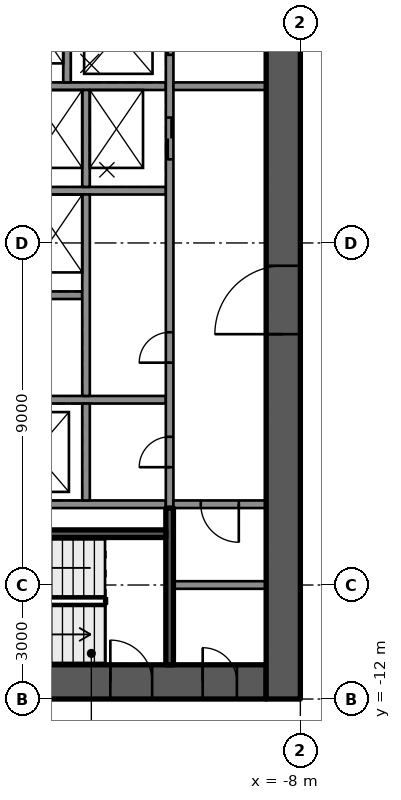
"""IFC4 building model, lengths in metres.
Left out: names, types, materials, properties, quantities, classifications, styles, units other than length and angle.
Written with IfcOpenShell. Run it as: python <this file> out.ifc"""

import sys

from ifc_helpers import new_model, si_unit, direction, frame, frame_2d, origin, place, context, subcontext, project, spatial, rectangle, extrude, element, fill, save


model = new_model("IFC4")
c1 = context("Model", 3, precision=1e-05, world=origin(), true_north=direction((0.0, 1.0)))
c2 = subcontext(c1, "Body", "Model", "MODEL_VIEW")
j1 = project(units=[si_unit("LENGTHUNIT", "METRE"), si_unit("PLANEANGLEUNIT", "RADIAN")], contexts=[c1])
p1 = place(None, origin())
s1 = spatial("IfcSite", under=j1, at=p1, CompositionType="ELEMENT")
p2 = place(p1, origin())
s2 = spatial("IfcBuilding", under=s1, at=p2, CompositionType="ELEMENT")
p3 = place(p2, frame((0.0, 0.0, 149.1)))
s3 = spatial("IfcBuildingStorey", under=s2, at=p3, CompositionType="ELEMENT", Elevation=149.1)
p4 = place(p3, frame((-18.1, -11.55, 0.0), z_axis=(0.0, 0.0, 1.0), x_axis=(1.0, 0.0, 0.0)))
e1 = element("IfcWall", 1, at=p4, inside=s3, PredefinedType="SHEAR", context=c2, shape_type="SweptSolid", body=[
    extrude(rectangle(XDim=9.2, YDim=0.9, at=frame_2d((4.6, 0.0))), origin(), (0.0, 0.0, 1.0), 3.5),
])
p5 = place(p4, frame((5.1, 0.0, 0.0)))
e2 = element("IfcOpeningElement", 2, at=p5, cuts=e1, PredefinedType="OPENING", context=c2, shape_type="SweptSolid", body=[
    extrude(rectangle(XDim=1.1, YDim=2.1, at=frame_2d((0.55, 1.05))), frame((0.0, 0.46, 0.0), z_axis=(0.0, -1.0, 0.0), x_axis=(1.0, 0.0, 0.0)), (0.0, 0.0, 1.0), 0.92),
])
p6 = place(p4, frame((7.53, 0.0, 0.0)))
e3 = element("IfcOpeningElement", 3, at=p6, cuts=e1, PredefinedType="OPENING", context=c2, shape_type="SweptSolid", body=[
    extrude(rectangle(XDim=0.9, YDim=2.1, at=frame_2d((0.45, 1.05))), frame((0.0, 0.46, 0.0), z_axis=(0.0, -1.0, 0.0), x_axis=(1.0, 0.0, 0.0)), (0.0, 0.0, 1.0), 0.92),
])
p7 = place(p3, frame((-8.45, -12.0, 0.0), z_axis=(0.0, 0.0, 1.0), x_axis=(0.0, 1.0, 0.0)))
e4 = element("IfcWall", 4, at=p7, inside=s3, PredefinedType="SHEAR", context=c2, shape_type="SweptSolid", body=[
    extrude(rectangle(XDim=24.0, YDim=0.9, at=frame_2d((12.0, 0.0))), origin(), (0.0, 0.0, 1.0), 3.5),
])
p8 = place(p7, frame((9.6, 0.0, 0.0)))
e5 = element("IfcOpeningElement", 5, at=p8, cuts=e4, PredefinedType="OPENING", context=c2, shape_type="SweptSolid", body=[
    extrude(rectangle(XDim=1.8, YDim=2.1, at=frame_2d((0.9, 1.05))), frame((0.0, 0.46, 0.0), z_axis=(0.0, -1.0, 0.0), x_axis=(1.0, 0.0, 0.0)), (0.0, 0.0, 1.0), 0.92),
])
p9 = place(p7, frame((19.65, 0.0, 0.0)))
e6 = element("IfcOpeningElement", 6, at=p9, cuts=e4, PredefinedType="OPENING", context=c2, shape_type="SweptSolid", body=[
    extrude(rectangle(XDim=1.1, YDim=2.1, at=frame_2d((0.55, 1.05))), frame((0.0, 0.46, 0.0), z_axis=(0.0, -1.0, 0.0), x_axis=(1.0, 0.0, 0.0)), (0.0, 0.0, 1.0), 0.92),
])
p10 = place(p3, frame((-11.54, -6.875, 0.0), z_axis=(0.0, 0.0, 1.0), x_axis=(-1.0, 0.0, 0.0)))
e7 = element("IfcWall", 7, at=p10, inside=s3, PredefinedType="SOLIDWALL", context=c2, shape_type="SweptSolid", body=[
    extrude(rectangle(XDim=6.56, YDim=0.2, at=frame_2d((3.28, 0.0))), origin(), (0.0, 0.0, 1.0), 3.09),
])
p11 = place(p3, frame((-11.54, -4.125, 0.0), z_axis=(0.0, 0.0, 1.0), x_axis=(-1.0, 0.0, 0.0)))
e8 = element("IfcWall", 8, at=p11, inside=s3, PredefinedType="SOLIDWALL", context=c2, shape_type="SweptSolid", body=[
    extrude(rectangle(XDim=4.7, YDim=0.2, at=frame_2d((2.35, 0.0))), origin(), (0.0, 0.0, 1.0), 3.09),
])
p12 = place(p3, frame((-13.74, -1.375, 0.0), z_axis=(0.0, 0.0, 1.0), x_axis=(-1.0, 0.0, 0.0)))
e9 = element("IfcWall", 9, at=p12, inside=s3, PredefinedType="SOLIDWALL", context=c2, shape_type="SweptSolid", body=[
    extrude(rectangle(XDim=2.0, YDim=0.2, at=frame_2d((1.0, 0.0))), origin(), (0.0, 0.0, 1.0), 3.09),
])
p13 = place(p3, frame((-11.54, 1.375, 0.0), z_axis=(0.0, 0.0, 1.0), x_axis=(-1.0, 0.0, 0.0)))
e10 = element("IfcWall", 10, at=p13, inside=s3, PredefinedType="SOLIDWALL", context=c2, shape_type="SweptSolid", body=[
    extrude(rectangle(XDim=4.2, YDim=0.2, at=frame_2d((2.1, 0.0))), origin(), (0.0, 0.0, 1.0), 3.09),
])
p14 = place(p3, frame((-11.54, 4.125, 0.0), z_axis=(0.0, 0.0, 1.0), x_axis=(-1.0, 0.0, 0.0)))
e11 = element("IfcWall", 11, at=p14, inside=s3, PredefinedType="SOLIDWALL", context=c2, shape_type="SweptSolid", body=[
    extrude(rectangle(XDim=4.7, YDim=0.2, at=frame_2d((2.35, 0.0))), origin(), (0.0, 0.0, 1.0), 3.09),
])
p15 = place(p3, frame((-11.44, -6.975, 0.0), z_axis=(0.0, 0.0, 1.0), x_axis=(0.0, 1.0, 0.0)))
e12 = element("IfcWall", 12, at=p15, inside=s3, PredefinedType="SOLIDWALL", context=c2, shape_type="SweptSolid", body=[
    extrude(rectangle(XDim=13.95, YDim=0.2, at=frame_2d((6.975, 0.0))), origin(), (0.0, 0.0, 1.0), 3.09),
])
p16 = place(p15, frame((9.175, 0.0, 0.0)))
e13 = element("IfcOpeningElement", 13, at=p16, cuts=e12, PredefinedType="OPENING", context=c2, shape_type="SweptSolid", body=[
    extrude(rectangle(XDim=1.1, YDim=2.1, at=frame_2d((0.55, 1.05))), frame((0.0, 0.11, 0.0), z_axis=(0.0, -1.0, 0.0), x_axis=(1.0, 0.0, 0.0)), (0.0, 0.0, 1.0), 0.22),
])
p17 = place(p15, frame((11.925, 0.0, 0.0)))
e14 = element("IfcOpeningElement", 14, at=p17, cuts=e12, PredefinedType="OPENING", context=c2, shape_type="SweptSolid", body=[
    extrude(rectangle(XDim=1.1, YDim=2.1, at=frame_2d((0.55, 1.05))), frame((0.0, 0.11, 0.0), z_axis=(0.0, -1.0, 0.0), x_axis=(1.0, 0.0, 0.0)), (0.0, 0.0, 1.0), 0.22),
])
p18 = place(p15, frame((1.075, 0.0, 0.0)))
e15 = element("IfcOpeningElement", 15, at=p18, cuts=e12, PredefinedType="OPENING", context=c2, shape_type="SweptSolid", body=[
    extrude(rectangle(XDim=0.8, YDim=2.1, at=frame_2d((0.4, 1.05))), frame((0.0, 0.11, 0.0), z_axis=(0.0, -1.0, 0.0), x_axis=(1.0, 0.0, 0.0)), (0.0, 0.0, 1.0), 0.22),
])
p19 = place(p15, frame((3.825, 0.0, 0.0)))
e16 = element("IfcOpeningElement", 16, at=p19, cuts=e12, PredefinedType="OPENING", context=c2, shape_type="SweptSolid", body=[
    extrude(rectangle(XDim=0.8, YDim=2.1, at=frame_2d((0.4, 1.05))), frame((0.0, 0.11, 0.0), z_axis=(0.0, -1.0, 0.0), x_axis=(1.0, 0.0, 0.0)), (0.0, 0.0, 1.0), 0.22),
])
p20 = place(p3, frame((-13.64, -6.775, 0.0), z_axis=(0.0, 0.0, 1.0), x_axis=(0.0, 1.0, 0.0)))
e17 = element("IfcWall", 17, at=p20, inside=s3, PredefinedType="SOLIDWALL", context=c2, shape_type="SweptSolid", body=[
    extrude(rectangle(XDim=2.55, YDim=0.2, at=frame_2d((1.275, 0.0))), origin(), (0.0, 0.0, 1.0), 3.09),
])
p21 = place(p3, frame((-13.64, -4.025, 0.0), z_axis=(0.0, 0.0, 1.0), x_axis=(0.0, 1.0, 0.0)))
e18 = element("IfcWall", 18, at=p21, inside=s3, PredefinedType="SOLIDWALL", context=c2, shape_type="SweptSolid", body=[
    extrude(rectangle(XDim=5.3, YDim=0.2, at=frame_2d((2.65, 0.0))), origin(), (0.0, 0.0, 1.0), 3.09),
])
for number, where, z_axis, x_axis in (
    (19, (-13.64, 1.475, 0.0), (0.0, 0.0, 1.0), (0.0, 1.0, 0.0)),
    (20, (-14.14, 4.225, 0.0), (0.0, 0.0, 1.0), (0.0, 1.0, 0.0)),
):
    element("IfcWall", number, at=place(p3, frame(where, z_axis=z_axis, x_axis=x_axis)), inside=s3, PredefinedType="SOLIDWALL", context=c2, shape_type="SweptSolid", body=[
        extrude(rectangle(XDim=2.55, YDim=0.2, at=frame_2d((1.275, 0.0))), origin(), (0.0, 0.0, 1.0), 3.09),
    ])
p22 = place(p3, frame((-11.44, -11.1, 0.0), z_axis=(0.0, 0.0, 1.0), x_axis=(0.0, 1.0, 0.0)))
e21 = element("IfcWall", 21, at=p22, inside=s3, PredefinedType="SOLIDWALL", context=c2, shape_type="SweptSolid", body=[
    extrude(rectangle(XDim=4.125, YDim=0.2, at=frame_2d((2.062, 0.0))), origin(), (0.0, 0.0, 1.0), 3.09),
])
p23 = place(p3, frame((-11.54, -7.65, 0.0), z_axis=(0.0, 0.0, 1.0), x_axis=(-1.0, 0.0, 0.0)))
e22 = element("IfcWall", 22, at=p23, inside=s3, PredefinedType="SOLIDWALL", context=c2, shape_type="SweptSolid", body=[
    extrude(rectangle(XDim=6.56, YDim=0.2, at=frame_2d((3.28, 0.0))), origin(), (0.0, 0.0, 1.0), 3.09),
])
p24 = place(p3, frame((-8.9, 4.125, 0.0), z_axis=(0.0, 0.0, 1.0), x_axis=(-1.0, 0.0, 0.0)))
e23 = element("IfcWall", 23, at=p24, inside=s3, PredefinedType="PARTITIONING", context=c2, shape_type="SweptSolid", body=[
    extrude(rectangle(XDim=2.44, YDim=0.2, at=frame_2d((1.22, 0.0))), origin(), (0.0, 0.0, 1.0), 3.09),
])
p25 = place(p3, frame((-8.9, -6.875, 0.0), z_axis=(0.0, 0.0, 1.0), x_axis=(-1.0, 0.0, 0.0)))
e24 = element("IfcWall", 24, at=p25, inside=s3, PredefinedType="PARTITIONING", context=c2, shape_type="SweptSolid", body=[
    extrude(rectangle(XDim=2.44, YDim=0.2, at=frame_2d((1.22, 0.0))), origin(), (0.0, 0.0, 1.0), 3.09),
])
p26 = place(p25, frame((0.72, 0.0, 0.0)))
e25 = element("IfcOpeningElement", 25, at=p26, cuts=e24, PredefinedType="OPENING", context=c2, shape_type="SweptSolid", body=[
    extrude(rectangle(XDim=1.0, YDim=2.1, at=frame_2d((0.5, 1.05))), frame((0.0, 0.11, 0.0), z_axis=(0.0, -1.0, 0.0), x_axis=(1.0, 0.0, 0.0)), (0.0, 0.0, 1.0), 0.22),
])
p27 = place(p3, frame((-8.9, -9.0, 0.0), z_axis=(0.0, 0.0, 1.0), x_axis=(-1.0, 0.0, 0.0)))
e26 = element("IfcWall", 26, at=p27, inside=s3, PredefinedType="PARTITIONING", context=c2, shape_type="SweptSolid", body=[
    extrude(rectangle(XDim=2.44, YDim=0.2, at=frame_2d((1.22, 0.0))), origin(), (0.0, 0.0, 1.0), 3.09),
])
p28 = place(p16, origin())
e27 = element("IfcDoor", 27, at=p28, inside=s3, OperationType="DOUBLE_DOOR_SLIDING", PredefinedType="DOOR", context=c2, shape_type="SweptSolid", body=[
    extrude(rectangle(XDim=1.1, YDim=2.1, at=frame_2d((0.55, 1.05))), frame((0.0, 0.025, 0.0), z_axis=(0.0, -1.0, 0.0), x_axis=(1.0, 0.0, 0.0)), (0.0, 0.0, 1.0), 0.05),
])
fill(e13, e27)
p29 = place(p17, origin())
e28 = element("IfcDoor", 28, at=p29, inside=s3, OperationType="DOUBLE_DOOR_SLIDING", PredefinedType="DOOR", context=c2, shape_type="SweptSolid", body=[
    extrude(rectangle(XDim=1.1, YDim=2.1, at=frame_2d((0.55, 1.05))), frame((0.0, 0.025, 0.0), z_axis=(0.0, -1.0, 0.0), x_axis=(1.0, 0.0, 0.0)), (0.0, 0.0, 1.0), 0.05),
])
fill(e14, e28)
p30 = place(p18, origin())
e29 = element("IfcDoor", 29, at=p30, inside=s3, OperationType="SINGLE_SWING_LEFT", PredefinedType="DOOR", context=c2, shape_type="SweptSolid", body=[
    extrude(rectangle(XDim=0.8, YDim=2.1, at=frame_2d((0.4, 1.05))), frame((0.0, 0.025, 0.0), z_axis=(0.0, -1.0, 0.0), x_axis=(1.0, 0.0, 0.0)), (0.0, 0.0, 1.0), 0.05),
])
fill(e15, e29)
p31 = place(p19, origin())
e30 = element("IfcDoor", 30, at=p31, inside=s3, OperationType="SINGLE_SWING_LEFT", PredefinedType="DOOR", context=c2, shape_type="SweptSolid", body=[
    extrude(rectangle(XDim=0.8, YDim=2.1, at=frame_2d((0.4, 1.05))), frame((0.0, 0.025, 0.0), z_axis=(0.0, -1.0, 0.0), x_axis=(1.0, 0.0, 0.0)), (0.0, 0.0, 1.0), 0.05),
])
fill(e16, e30)
p32 = place(p8, origin())
e31 = element("IfcDoor", 31, at=p32, inside=s3, OperationType="SINGLE_SWING_LEFT", PredefinedType="DOOR", context=c2, shape_type="SweptSolid", body=[
    extrude(rectangle(XDim=1.8, YDim=2.1, at=frame_2d((0.9, 1.05))), frame((0.0, 0.025, 0.0), z_axis=(0.0, -1.0, 0.0), x_axis=(1.0, 0.0, 0.0)), (0.0, 0.0, 1.0), 0.05),
])
fill(e5, e31)
p33 = place(p5, origin())
e32 = element("IfcDoor", 32, at=p33, inside=s3, OperationType="SINGLE_SWING_RIGHT", PredefinedType="DOOR", context=c2, shape_type="SweptSolid", body=[
    extrude(rectangle(XDim=1.1, YDim=2.1, at=frame_2d((0.55, 1.05))), frame((0.0, 0.025, 0.0), z_axis=(0.0, -1.0, 0.0), x_axis=(1.0, 0.0, 0.0)), (0.0, 0.0, 1.0), 0.05),
])
fill(e2, e32)
p34 = place(p6, origin())
e33 = element("IfcDoor", 33, at=p34, inside=s3, OperationType="SINGLE_SWING_RIGHT", PredefinedType="DOOR", context=c2, shape_type="SweptSolid", body=[
    extrude(rectangle(XDim=0.9, YDim=2.1, at=frame_2d((0.45, 1.05))), frame((0.0, 0.025, 0.0), z_axis=(0.0, -1.0, 0.0), x_axis=(1.0, 0.0, 0.0)), (0.0, 0.0, 1.0), 0.05),
])
fill(e3, e33)
p35 = place(p26, origin())
e34 = element("IfcDoor", 34, at=p35, inside=s3, OperationType="SINGLE_SWING_RIGHT", PredefinedType="DOOR", context=c2, shape_type="SweptSolid", body=[
    extrude(rectangle(XDim=1.0, YDim=2.1, at=frame_2d((0.5, 1.05))), frame((0.0, 0.025, 0.0), z_axis=(0.0, -1.0, 0.0), x_axis=(1.0, 0.0, 0.0)), (0.0, 0.0, 1.0), 0.05),
])
fill(e25, e34)
save(model, sys.argv[1])
